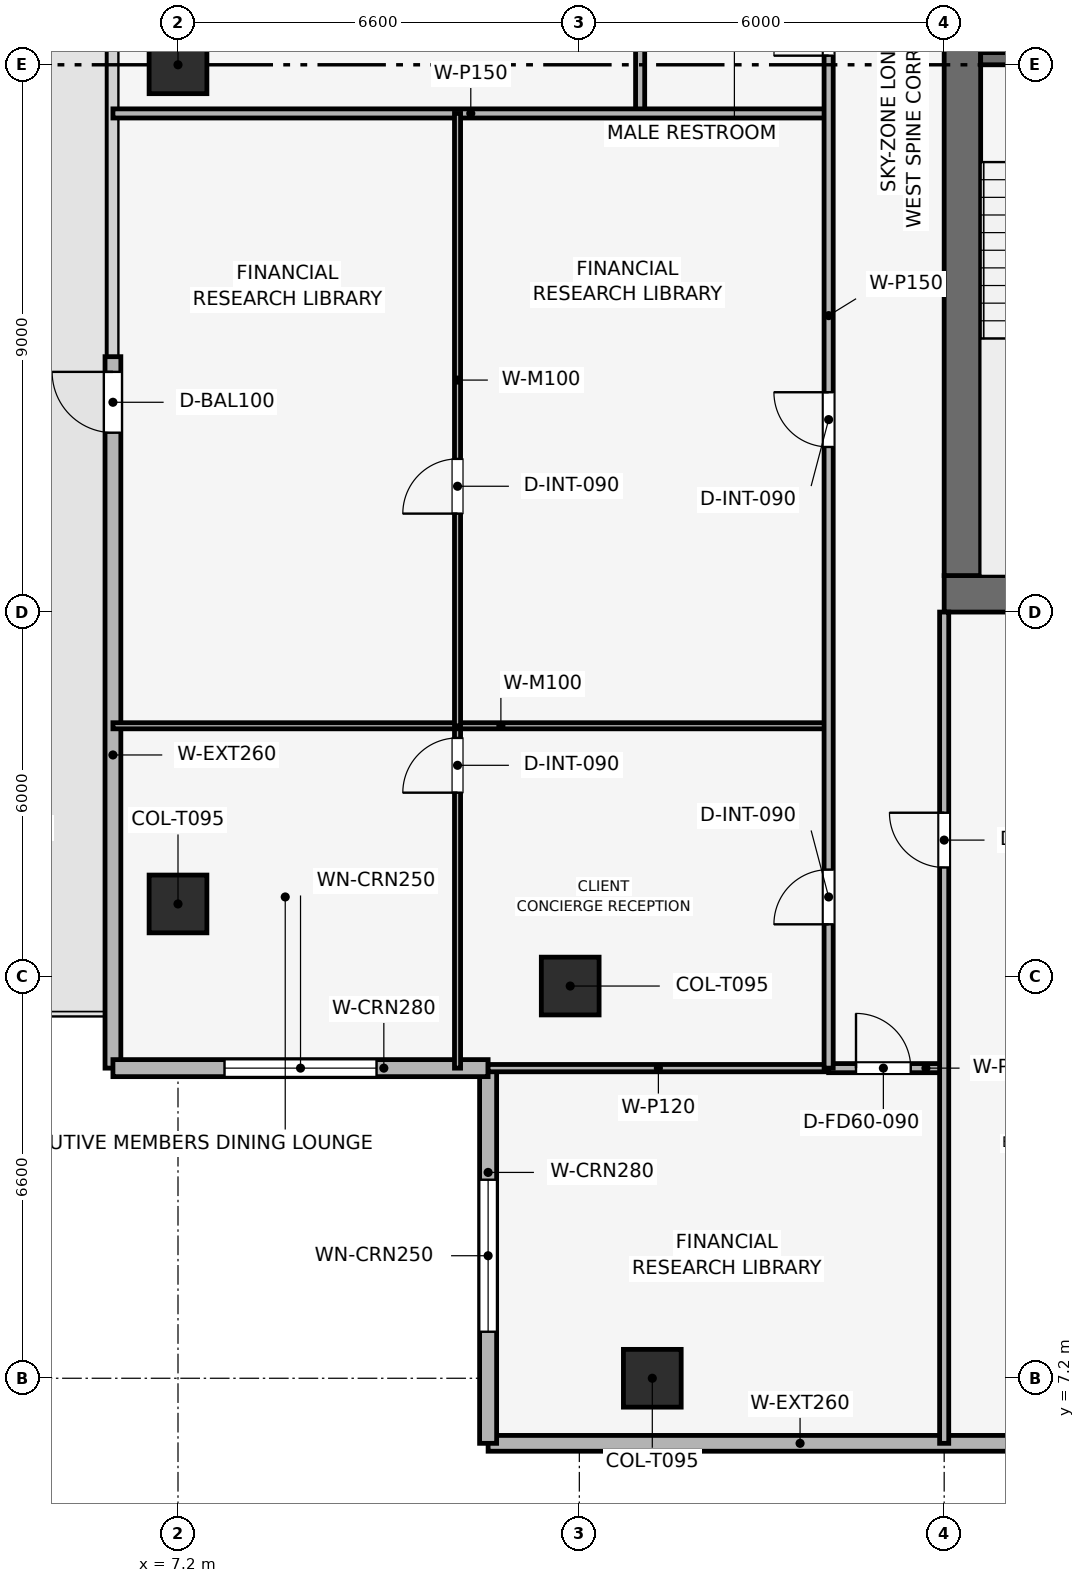
"""IFC4 building model, lengths in metres.
Left out: names, types, materials, properties, quantities, classifications, styles, units other than length and angle.
Written with IfcOpenShell. Run it as: python <this file> out.ifc"""

import sys

from ifc_helpers import new_model, si_unit, direction, frame, frame_2d, origin, origin_2d, place, context, subcontext, project, spatial, rectangle, extrude, element, fill, save


model = new_model("IFC4")
c1 = context("Model", 3, precision=1e-05, world=origin(), true_north=direction((0.0, 1.0)))
c2 = subcontext(c1, "Body", "Model", "MODEL_VIEW")
j1 = project(units=[si_unit("LENGTHUNIT", "METRE"), si_unit("PLANEANGLEUNIT", "RADIAN")], contexts=[c1])
p1 = place(None, origin())
s1 = spatial("IfcSite", under=j1, at=p1, CompositionType="ELEMENT")
p2 = place(p1, origin())
s2 = spatial("IfcBuilding", under=s1, at=p2, CompositionType="ELEMENT")
p3 = place(p2, frame((0.0, 0.0, 299.25)))
s3 = spatial("IfcBuildingStorey", under=s2, at=p3, CompositionType="ELEMENT", Elevation=299.25)
p4 = place(p3, frame((19.8, 20.1, 0.0), z_axis=(0.0, 0.0, 1.0), x_axis=(1.0, 0.0, 0.0)))
e1 = element("IfcWall", 1, at=p4, inside=s3, PredefinedType="SHEAR", context=c2, shape_type="SweptSolid", body=[
    extrude(rectangle(XDim=18.0, YDim=0.6, at=frame_2d((9.0, 0.0))), origin(), (0.0, 0.0, 1.0), 3.75),
])
p5 = place(p3, frame((20.1, 20.4, 0.0), z_axis=(0.0, 0.0, 1.0), x_axis=(0.0, 1.0, 0.0)))
e2 = element("IfcWall", 2, at=p5, inside=s3, PredefinedType="SHEAR", context=c2, shape_type="SweptSolid", body=[
    extrude(rectangle(XDim=16.8, YDim=0.6, at=frame_2d((8.4, 0.0))), origin(), (0.0, 0.0, 1.0), 3.75),
])
p6 = place(p5, frame((10.4, 0.0, 0.0)))
e3 = element("IfcOpeningElement", 3, at=p6, cuts=e2, PredefinedType="OPENING", context=c2, shape_type="SweptSolid", body=[
    extrude(rectangle(XDim=1.1, YDim=2.15, at=frame_2d((0.55, 1.075))), frame((0.0, 0.31, 0.0), z_axis=(0.0, -1.0, 0.0), x_axis=(1.0, 0.0, 0.0)), (0.0, 0.0, 1.0), 0.62),
])
for number, where, z_axis, x_axis in (
    (4, (15.0, 7.2, 0.003), (0.0, 0.0, 1.0), (1.0, 0.0, 0.0)),
    (5, (7.2, 28.8, 0.003), (0.0, 0.0, 1.0), (1.0, 0.0, 0.0)),
    (6, (7.2, 15.0, 0.003), (0.0, 0.0, 1.0), (1.0, 0.0, 0.0)),
    (7, (13.65, 13.65, 0.003), (0.0, 0.0, 1.0), (1.0, 0.0, 0.0)),
):
    element("IfcColumn", number, at=place(p3, frame(where, z_axis=z_axis, x_axis=x_axis)), inside=s3, PredefinedType="COLUMN", context=c2, shape_type="SweptSolid", body=[
        extrude(rectangle(XDim=0.95, YDim=0.95, at=origin_2d()), origin(), (0.0, 0.0, 1.0), 3.504),
    ])
p7 = place(p3, frame((24.0, 6.13, 0.0), z_axis=(0.0, 0.0, 1.0), x_axis=(-1.0, 0.0, 0.0)))
e8 = element("IfcWall", 8, at=p7, inside=s3, PredefinedType="SOLIDWALL", context=c2, shape_type="SweptSolid", body=[
    extrude(rectangle(XDim=11.7, YDim=0.26, at=frame_2d((5.85, 0.0))), origin(), (0.0, 0.0, 1.0), 3.51),
])
p8 = place(p7, frame((0.25, 0.0, 0.9)))
e9 = element("IfcOpeningElement", 9, at=p8, cuts=e8, PredefinedType="OPENING", context=c2, shape_type="SweptSolid", body=[
    extrude(rectangle(XDim=1.2, YDim=2.1, at=frame_2d((0.6, 1.05))), frame((0.0, 0.14, 0.0), z_axis=(0.0, -1.0, 0.0), x_axis=(1.0, 0.0, 0.0)), (0.0, 0.0, 1.0), 0.28),
])
p9 = place(p3, frame((6.13, 12.3, 0.0), z_axis=(0.0, 0.0, 1.0), x_axis=(0.0, 1.0, 0.0)))
e10 = element("IfcWall", 10, at=p9, inside=s3, PredefinedType="SOLIDWALL", context=c2, shape_type="SweptSolid", body=[
    extrude(rectangle(XDim=11.7, YDim=0.26, at=frame_2d((5.85, 0.0))), origin(), (0.0, 0.0, 1.0), 3.51),
])
p10 = place(p9, frame((10.45, 0.0, 0.0)))
e11 = element("IfcOpeningElement", 11, at=p10, cuts=e10, PredefinedType="OPENING", context=c2, shape_type="SweptSolid", body=[
    extrude(rectangle(XDim=1.0, YDim=2.2, at=frame_2d((0.5, 1.1))), frame((0.0, 0.14, 0.0), z_axis=(0.0, -1.0, 0.0), x_axis=(1.0, 0.0, 0.0)), (0.0, 0.0, 1.0), 0.28),
])
p11 = place(p3, frame((12.3, 6.13, 0.0), z_axis=(0.0, 0.0, 1.0), x_axis=(0.0, 1.0, 0.0)))
e12 = element("IfcWall", 12, at=p11, inside=s3, PredefinedType="SOLIDWALL", context=c2, shape_type="SweptSolid", body=[
    extrude(rectangle(XDim=6.17, YDim=0.28, at=frame_2d((3.085, 0.0))), origin(), (0.0, 0.0, 1.0), 3.51),
])
p12 = place(p11, frame((1.835, 0.0, 0.9)))
e13 = element("IfcOpeningElement", 13, at=p12, cuts=e12, PredefinedType="OPENING", context=c2, shape_type="SweptSolid", body=[
    extrude(rectangle(XDim=2.5, YDim=1.9, at=frame_2d((1.25, 0.95))), frame((0.0, 0.15, 0.0), z_axis=(0.0, -1.0, 0.0), x_axis=(1.0, 0.0, 0.0)), (0.0, 0.0, 1.0), 0.3),
])
p13 = place(p3, frame((12.3, 12.3, 0.0), z_axis=(0.0, 0.0, 1.0), x_axis=(-1.0, 0.0, 0.0)))
e14 = element("IfcWall", 14, at=p13, inside=s3, PredefinedType="SOLIDWALL", context=c2, shape_type="SweptSolid", body=[
    extrude(rectangle(XDim=6.17, YDim=0.28, at=frame_2d((3.085, 0.0))), origin(), (0.0, 0.0, 1.0), 3.51),
])
p14 = place(p13, frame((1.835, 0.0, 0.9)))
e15 = element("IfcOpeningElement", 15, at=p14, cuts=e14, PredefinedType="OPENING", context=c2, shape_type="SweptSolid", body=[
    extrude(rectangle(XDim=2.5, YDim=1.9, at=frame_2d((1.25, 0.95))), frame((0.0, 0.15, 0.0), z_axis=(0.0, -1.0, 0.0), x_axis=(1.0, 0.0, 0.0)), (0.0, 0.0, 1.0), 0.3),
])
p15 = place(p3, frame((20.4, 28.9, 0.0), z_axis=(0.0, 0.0, 1.0), x_axis=(1.0, 0.0, 0.0)))
e16 = element("IfcWall", 16, at=p15, inside=s3, PredefinedType="SHEAR", context=c2, shape_type="SweptSolid", body=[
    extrude(rectangle(XDim=3.15, YDim=0.2, at=frame_2d((1.575, 0.0))), origin(), (0.0, 0.0, 1.0), 3.51),
])
p16 = place(p15, frame((0.8, 0.0, 0.0)))
e17 = element("IfcOpeningElement", 17, at=p16, cuts=e16, PredefinedType="OPENING", context=c2, shape_type="SweptSolid", body=[
    extrude(rectangle(XDim=1.0, YDim=2.1, at=frame_2d((0.5, 1.05))), frame((0.0, 0.11, 0.0), z_axis=(0.0, -1.0, 0.0), x_axis=(1.0, 0.0, 0.0)), (0.0, 0.0, 1.0), 0.22),
])
p17 = place(p3, frame((14.8, 28.0, 0.0), z_axis=(0.0, 0.0, 1.0), x_axis=(0.0, 1.0, 0.0)))
e18 = element("IfcWall", 18, at=p17, inside=s3, PredefinedType="PARTITIONING", context=c2, shape_type="SweptSolid", body=[
    extrude(rectangle(XDim=11.7, YDim=0.15, at=frame_2d((5.85, 0.0))), origin(), (0.0, 0.0, 1.0), 3.095),
])
p18 = place(p17, frame((9.6, 0.0, 0.0)))
e19 = element("IfcOpeningElement", 19, at=p18, cuts=e18, PredefinedType="OPENING", context=c2, shape_type="SweptSolid", body=[
    extrude(rectangle(XDim=0.9, YDim=2.1, at=frame_2d((0.45, 1.05))), frame((0.0, 0.085, 0.0), z_axis=(0.0, -1.0, 0.0), x_axis=(1.0, 0.0, 0.0)), (0.0, 0.0, 1.0), 0.17),
])
p19 = place(p3, frame((6.13, 28.0, 0.0), z_axis=(0.0, 0.0, 1.0), x_axis=(1.0, 0.0, 0.0)))
e20 = element("IfcWall", 20, at=p19, inside=s3, PredefinedType="PARTITIONING", context=c2, shape_type="SweptSolid", body=[
    extrude(rectangle(XDim=11.77, YDim=0.15, at=frame_2d((5.885, 0.0))), origin(), (0.0, 0.0, 1.0), 3.135),
])
p20 = place(p3, frame((11.797, 12.3, 0.0), z_axis=(0.0, 0.0, 1.0), x_axis=(0.0, 1.0, 0.0)))
e21 = element("IfcWall", 21, at=p20, inside=s3, PredefinedType="MOVABLE", context=c2, shape_type="SweptSolid", body=[
    extrude(rectangle(XDim=5.63, YDim=0.1, at=frame_2d((2.815, 0.0))), origin(), (0.0, 0.0, 1.0), 3.195),
])
p21 = place(p20, frame((4.53, 0.0, 0.0)))
e22 = element("IfcOpeningElement", 22, at=p21, cuts=e21, PredefinedType="OPENING", context=c2, shape_type="SweptSolid", body=[
    extrude(rectangle(XDim=0.9, YDim=2.1, at=frame_2d((0.45, 1.05))), frame((0.0, 0.06, 0.0), z_axis=(0.0, -1.0, 0.0), x_axis=(1.0, 0.0, 0.0)), (0.0, 0.0, 1.0), 0.12),
])
p22 = place(p3, frame((6.13, 17.93, 0.0), z_axis=(0.0, 0.0, 1.0), x_axis=(1.0, 0.0, 0.0)))
e23 = element("IfcWall", 23, at=p22, inside=s3, PredefinedType="MOVABLE", context=c2, shape_type="SweptSolid", body=[
    extrude(rectangle(XDim=11.77, YDim=0.1, at=frame_2d((5.885, 0.0))), origin(), (0.0, 0.0, 1.0), 3.095),
])
p23 = place(p3, frame((11.797, 17.93, 0.0), z_axis=(0.0, 0.0, 1.0), x_axis=(0.0, 1.0, 0.0)))
e24 = element("IfcWall", 24, at=p23, inside=s3, PredefinedType="MOVABLE", context=c2, shape_type="SweptSolid", body=[
    extrude(rectangle(XDim=10.07, YDim=0.1, at=frame_2d((5.035, 0.0))), origin(), (0.0, 0.0, 1.0), 3.095),
])
p24 = place(p23, frame((3.489, 0.0, 0.0)))
e25 = element("IfcOpeningElement", 25, at=p24, cuts=e24, PredefinedType="OPENING", context=c2, shape_type="SweptSolid", body=[
    extrude(rectangle(XDim=0.9, YDim=2.1, at=frame_2d((0.45, 1.05))), frame((0.0, 0.06, 0.0), z_axis=(0.0, -1.0, 0.0), x_axis=(1.0, 0.0, 0.0)), (0.0, 0.0, 1.0), 0.12),
])
p25 = place(p3, frame((12.3, 12.3, 0.0), z_axis=(0.0, 0.0, 1.0), x_axis=(1.0, 0.0, 0.0)))
e26 = element("IfcWall", 26, at=p25, inside=s3, PredefinedType="PARTITIONING", context=c2, shape_type="SweptSolid", body=[
    extrude(rectangle(XDim=5.6, YDim=0.12, at=frame_2d((2.8, 0.0))), origin(), (0.0, 0.0, 1.0), 3.195),
])
p26 = place(p3, frame((17.9, 12.3, 0.0), z_axis=(0.0, 0.0, 1.0), x_axis=(1.0, 0.0, 0.0)))
e27 = element("IfcWall", 27, at=p26, inside=s3, PredefinedType="PARTITIONING", context=c2, shape_type="SweptSolid", body=[
    extrude(rectangle(XDim=1.9, YDim=0.15, at=frame_2d((0.95, 0.0))), origin(), (0.0, 0.0, 1.0), 3.51),
])
p27 = place(p26, frame((0.45, 0.0, 0.0)))
e28 = element("IfcOpeningElement", 28, at=p27, cuts=e27, PredefinedType="OPENING", context=c2, shape_type="SweptSolid", body=[
    extrude(rectangle(XDim=0.9, YDim=2.1, at=frame_2d((0.45, 1.05))), frame((0.0, 0.085, 0.0), z_axis=(0.0, -1.0, 0.0), x_axis=(1.0, 0.0, 0.0)), (0.0, 0.0, 1.0), 0.17),
])
p28 = place(p3, frame((19.8, 6.13, 0.0), z_axis=(0.0, 0.0, 1.0), x_axis=(0.0, 1.0, 0.0)))
e29 = element("IfcWall", 29, at=p28, inside=s3, PredefinedType="PARTITIONING", context=c2, shape_type="SweptSolid", body=[
    extrude(rectangle(XDim=13.67, YDim=0.15, at=frame_2d((6.835, 0.0))), origin(), (0.0, 0.0, 1.0), 3.095),
])
p29 = place(p28, frame((9.47, 0.0, 0.0)))
e30 = element("IfcOpeningElement", 30, at=p29, cuts=e29, PredefinedType="OPENING", context=c2, shape_type="SweptSolid", body=[
    extrude(rectangle(XDim=0.9, YDim=2.1, at=frame_2d((0.45, 1.05))), frame((0.0, 0.085, 0.0), z_axis=(0.0, -1.0, 0.0), x_axis=(1.0, 0.0, 0.0)), (0.0, 0.0, 1.0), 0.17),
])
p30 = place(p3, frame((17.9, 12.3, 0.0), z_axis=(0.0, 0.0, 1.0), x_axis=(0.0, 1.0, 0.0)))
e31 = element("IfcWall", 31, at=p30, inside=s3, PredefinedType="PARTITIONING", context=c2, shape_type="SweptSolid", body=[
    extrude(rectangle(XDim=27.4, YDim=0.15, at=frame_2d((13.7, 0.0))), origin(), (0.0, 0.0, 1.0), 3.095),
])
p31 = place(p30, frame((2.365, 0.0, 0.0)))
e32 = element("IfcOpeningElement", 32, at=p31, cuts=e31, PredefinedType="OPENING", context=c2, shape_type="SweptSolid", body=[
    extrude(rectangle(XDim=0.9, YDim=2.1, at=frame_2d((0.45, 1.05))), frame((0.0, 0.085, 0.0), z_axis=(0.0, -1.0, 0.0), x_axis=(1.0, 0.0, 0.0)), (0.0, 0.0, 1.0), 0.17),
])
p32 = place(p30, frame((10.215, 0.0, 0.0)))
e33 = element("IfcOpeningElement", 33, at=p32, cuts=e31, PredefinedType="OPENING", context=c2, shape_type="SweptSolid", body=[
    extrude(rectangle(XDim=0.9, YDim=2.1, at=frame_2d((0.45, 1.05))), frame((0.0, 0.085, 0.0), z_axis=(0.0, -1.0, 0.0), x_axis=(1.0, 0.0, 0.0)), (0.0, 0.0, 1.0), 0.17),
])
p33 = place(p30, frame((16.65, 0.0, 0.0)))
e34 = element("IfcOpeningElement", 34, at=p33, cuts=e31, PredefinedType="OPENING", context=c2, shape_type="SweptSolid", body=[
    extrude(rectangle(XDim=0.9, YDim=2.1, at=frame_2d((0.45, 1.05))), frame((0.0, 0.085, 0.0), z_axis=(0.0, -1.0, 0.0), x_axis=(1.0, 0.0, 0.0)), (0.0, 0.0, 1.0), 0.17),
])
p34 = place(p30, frame((19.55, 0.0, 0.0)))
e35 = element("IfcOpeningElement", 35, at=p34, cuts=e31, PredefinedType="OPENING", context=c2, shape_type="SweptSolid", body=[
    extrude(rectangle(XDim=0.9, YDim=2.1, at=frame_2d((0.45, 1.05))), frame((0.0, 0.085, 0.0), z_axis=(0.0, -1.0, 0.0), x_axis=(1.0, 0.0, 0.0)), (0.0, 0.0, 1.0), 0.17),
])
p35 = place(p30, frame((22.3, 0.0, 0.0)))
e36 = element("IfcOpeningElement", 36, at=p35, cuts=e31, PredefinedType="OPENING", context=c2, shape_type="SweptSolid", body=[
    extrude(rectangle(XDim=0.95, YDim=2.1, at=frame_2d((0.475, 1.05))), frame((0.0, 0.085, 0.0), z_axis=(0.0, -1.0, 0.0), x_axis=(1.0, 0.0, 0.0)), (0.0, 0.0, 1.0), 0.17),
])
p36 = place(p30, frame((25.3, 0.0, 0.0)))
e37 = element("IfcOpeningElement", 37, at=p36, cuts=e31, PredefinedType="OPENING", context=c2, shape_type="SweptSolid", body=[
    extrude(rectangle(XDim=0.9, YDim=2.1, at=frame_2d((0.45, 1.05))), frame((0.0, 0.085, 0.0), z_axis=(0.0, -1.0, 0.0), x_axis=(1.0, 0.0, 0.0)), (0.0, 0.0, 1.0), 0.17),
])
p37 = place(p10, origin())
e38 = element("IfcDoor", 38, at=p37, inside=s3, OperationType="SINGLE_SWING_RIGHT", PredefinedType="DOOR", context=c2, shape_type="SweptSolid", body=[
    extrude(rectangle(XDim=1.0, YDim=2.2, at=frame_2d((0.5, 1.1))), frame((0.0, 0.025, 0.0), z_axis=(0.0, -1.0, 0.0), x_axis=(1.0, 0.0, 0.0)), (0.0, 0.0, 1.0), 0.05),
])
fill(e11, e38)
p38 = place(p12, origin())
e39 = element("IfcWindow", 39, at=p38, inside=s3, PartitioningType="SINGLE_PANEL", PredefinedType="WINDOW", context=c2, shape_type="SweptSolid", body=[
    extrude(rectangle(XDim=2.5, YDim=1.9, at=frame_2d((1.25, 0.95))), frame((0.0, 0.03, 0.0), z_axis=(0.0, -1.0, 0.0), x_axis=(1.0, 0.0, 0.0)), (0.0, 0.0, 1.0), 0.06),
])
fill(e13, e39)
p39 = place(p14, origin())
e40 = element("IfcWindow", 40, at=p39, inside=s3, PartitioningType="SINGLE_PANEL", PredefinedType="WINDOW", context=c2, shape_type="SweptSolid", body=[
    extrude(rectangle(XDim=2.5, YDim=1.9, at=frame_2d((1.25, 0.95))), frame((0.0, 0.03, 0.0), z_axis=(0.0, -1.0, 0.0), x_axis=(1.0, 0.0, 0.0)), (0.0, 0.0, 1.0), 0.06),
])
fill(e15, e40)
p40 = place(p21, origin())
e41 = element("IfcDoor", 41, at=p40, inside=s3, OperationType="SINGLE_SWING_LEFT", PredefinedType="DOOR", context=c2, shape_type="SweptSolid", body=[
    extrude(rectangle(XDim=0.9, YDim=2.1, at=frame_2d((0.45, 1.05))), frame((0.0, 0.025, 0.0), z_axis=(0.0, -1.0, 0.0), x_axis=(1.0, 0.0, 0.0)), (0.0, 0.0, 1.0), 0.05),
])
fill(e22, e41)
p41 = place(p24, origin())
e42 = element("IfcDoor", 42, at=p41, inside=s3, OperationType="SINGLE_SWING_LEFT", PredefinedType="DOOR", context=c2, shape_type="SweptSolid", body=[
    extrude(rectangle(XDim=0.9, YDim=2.1, at=frame_2d((0.45, 1.05))), frame((0.0, 0.025, 0.0), z_axis=(0.0, -1.0, 0.0), x_axis=(1.0, 0.0, 0.0)), (0.0, 0.0, 1.0), 0.05),
])
fill(e25, e42)
p42 = place(p27, origin())
e43 = element("IfcDoor", 43, at=p42, inside=s3, OperationType="SINGLE_SWING_LEFT", PredefinedType="DOOR", context=c2, shape_type="SweptSolid", body=[
    extrude(rectangle(XDim=0.9, YDim=2.1, at=frame_2d((0.45, 1.05))), frame((0.0, 0.025, 0.0), z_axis=(0.0, -1.0, 0.0), x_axis=(1.0, 0.0, 0.0)), (0.0, 0.0, 1.0), 0.05),
])
fill(e28, e43)
p43 = place(p29, origin())
e44 = element("IfcDoor", 44, at=p43, inside=s3, OperationType="SINGLE_SWING_RIGHT", PredefinedType="DOOR", context=c2, shape_type="SweptSolid", body=[
    extrude(rectangle(XDim=0.9, YDim=2.1, at=frame_2d((0.45, 1.05))), frame((0.0, 0.025, 0.0), z_axis=(0.0, -1.0, 0.0), x_axis=(1.0, 0.0, 0.0)), (0.0, 0.0, 1.0), 0.05),
])
fill(e30, e44)
p44 = place(p31, origin())
e45 = element("IfcDoor", 45, at=p44, inside=s3, OperationType="SINGLE_SWING_LEFT", PredefinedType="DOOR", context=c2, shape_type="SweptSolid", body=[
    extrude(rectangle(XDim=0.9, YDim=2.1, at=frame_2d((0.45, 1.05))), frame((0.0, 0.025, 0.0), z_axis=(0.0, -1.0, 0.0), x_axis=(1.0, 0.0, 0.0)), (0.0, 0.0, 1.0), 0.05),
])
fill(e32, e45)
p45 = place(p32, origin())
e46 = element("IfcDoor", 46, at=p45, inside=s3, OperationType="SINGLE_SWING_RIGHT", PredefinedType="DOOR", context=c2, shape_type="SweptSolid", body=[
    extrude(rectangle(XDim=0.9, YDim=2.1, at=frame_2d((0.45, 1.05))), frame((0.0, 0.025, 0.0), z_axis=(0.0, -1.0, 0.0), x_axis=(1.0, 0.0, 0.0)), (0.0, 0.0, 1.0), 0.05),
])
fill(e33, e46)
p46 = place(p33, origin())
e47 = element("IfcDoor", 47, at=p46, inside=s3, OperationType="SINGLE_SWING_LEFT", PredefinedType="DOOR", context=c2, shape_type="SweptSolid", body=[
    extrude(rectangle(XDim=0.9, YDim=2.1, at=frame_2d((0.45, 1.05))), frame((0.0, 0.025, 0.0), z_axis=(0.0, -1.0, 0.0), x_axis=(1.0, 0.0, 0.0)), (0.0, 0.0, 1.0), 0.05),
])
fill(e34, e47)
save(model, sys.argv[1])
